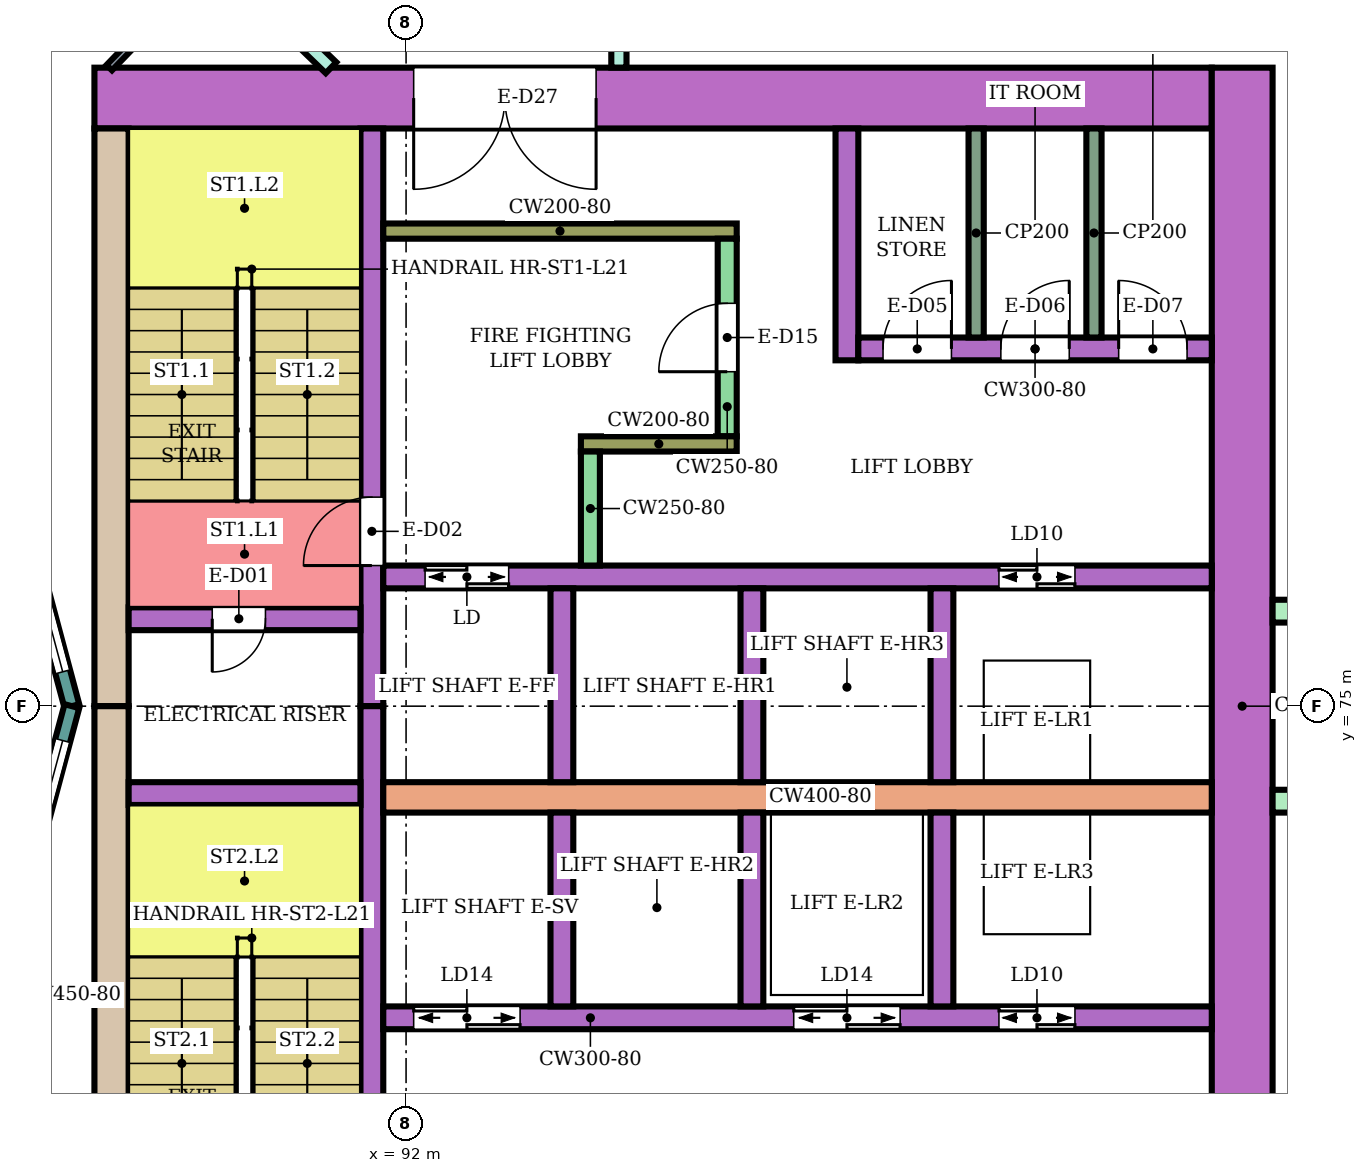
"""IFC4 building model, lengths in metres.
Left out: names, types, materials, properties, quantities, classifications, styles, units other than length and angle.
Written with IfcOpenShell. Run it as: python <this file> out.ifc"""

import sys

from ifc_helpers import new_model, si_unit, direction, frame, frame_2d, origin, place, context, subcontext, project, spatial, rectangle, extrude, element, fill, save


model = new_model("IFC4")
c1 = context("Model", 3, precision=1e-05, world=origin(), true_north=direction((0.0, 1.0)))
c2 = subcontext(c1, "Body", "Model", "MODEL_VIEW")
j1 = project(units=[si_unit("LENGTHUNIT", "METRE"), si_unit("PLANEANGLEUNIT", "RADIAN")], contexts=[c1])
p1 = place(None, origin())
s1 = spatial("IfcSite", under=j1, at=p1, CompositionType="ELEMENT")
p2 = place(p1, origin())
s2 = spatial("IfcBuilding", under=s1, at=p2, CompositionType="ELEMENT")
p3 = place(p2, frame((0.0, 0.0, 93.8)))
s3 = spatial("IfcBuildingStorey", under=s2, at=p3, CompositionType="ELEMENT", Elevation=93.8)
p4 = place(p3, frame((87.9, 83.0, 0.0), z_axis=(0.0, 0.0, 1.0), x_axis=(1.0, 0.0, 0.0)))
e1 = element("IfcWall", 1, at=p4, inside=s3, PredefinedType="SHEAR", context=c2, shape_type="SweptSolid", body=[
    extrude(rectangle(XDim=14.7, YDim=0.8, at=frame_2d((7.35, 0.0))), origin(), (0.0, 0.0, 1.0), 3.48),
])
p5 = place(p4, frame((4.2, 0.0, 0.0)))
e2 = element("IfcOpeningElement", 2, at=p5, cuts=e1, PredefinedType="OPENING", context=c2, shape_type="SweptSolid", body=[
    extrude(rectangle(XDim=2.4, YDim=2.4, at=frame_2d((1.2, 1.2))), frame((0.0, 0.41, 0.0), z_axis=(0.0, -1.0, 0.0), x_axis=(1.0, 0.0, 0.0)), (0.0, 0.0, 1.0), 0.82),
])
for number, where, z_axis, x_axis in (
    (3, (88.125, 75.0, 0.0), (0.0, 0.0, 1.0), (0.0, 1.0, 0.0)),
    (4, (88.125, 67.4, 0.0), (0.0, 0.0, 1.0), (0.0, 1.0, 0.0)),
):
    element("IfcWall", number, at=place(p3, frame(where, z_axis=z_axis, x_axis=x_axis)), inside=s3, PredefinedType="SHEAR", context=c2, shape_type="SweptSolid", body=[
        extrude(rectangle(XDim=7.6, YDim=0.45, at=frame_2d((3.8, 0.0))), origin(), (0.0, 0.0, 1.0), 3.48),
    ])
p6 = place(p3, frame((103.0, 66.6, 0.0), z_axis=(0.0, 0.0, 1.0), x_axis=(0.0, 1.0, 0.0)))
e5 = element("IfcWall", 5, at=p6, inside=s3, PredefinedType="SHEAR", context=c2, shape_type="SweptSolid", body=[
    extrude(rectangle(XDim=16.8, YDim=0.8, at=frame_2d((8.4, 0.0))), origin(), (0.0, 0.0, 1.0), 3.48),
])
p7 = place(p3, frame((91.55, 75.0, 0.0), z_axis=(0.0, 0.0, 1.0), x_axis=(0.0, 1.0, 0.0)))
e6 = element("IfcWall", 6, at=p7, inside=s3, PredefinedType="SHEAR", context=c2, shape_type="SweptSolid", body=[
    extrude(rectangle(XDim=7.6, YDim=0.3, at=frame_2d((3.8, 0.0))), origin(), (0.0, 0.0, 1.0), 3.48),
])
p8 = place(p7, frame((1.85, 0.0, 0.0)))
e7 = element("IfcOpeningElement", 7, at=p8, cuts=e6, PredefinedType="OPENING", context=c2, shape_type="SweptSolid", body=[
    extrude(rectangle(XDim=0.9, YDim=2.1, at=frame_2d((0.45, 1.05))), frame((0.0, 0.16, 0.0), z_axis=(0.0, -1.0, 0.0), x_axis=(1.0, 0.0, 0.0)), (0.0, 0.0, 1.0), 0.32),
])
p9 = place(p3, frame((91.55, 67.4, 0.0), z_axis=(0.0, 0.0, 1.0), x_axis=(0.0, 1.0, 0.0)))
e8 = element("IfcWall", 8, at=p9, inside=s3, PredefinedType="SHEAR", context=c2, shape_type="SweptSolid", body=[
    extrude(rectangle(XDim=7.6, YDim=0.3, at=frame_2d((3.8, 0.0))), origin(), (0.0, 0.0, 1.0), 3.48),
])
p10 = place(p9, frame((0.25, 0.0, 0.0)))
e9 = element("IfcOpeningElement", 9, at=p10, cuts=e8, PredefinedType="OPENING", context=c2, shape_type="SweptSolid", body=[
    extrude(rectangle(XDim=0.9, YDim=2.1, at=frame_2d((0.45, 1.05))), frame((0.0, 0.16, 0.0), z_axis=(0.0, -1.0, 0.0), x_axis=(1.0, 0.0, 0.0)), (0.0, 0.0, 1.0), 0.32),
])
p11 = place(p3, frame((88.35, 76.15, 0.0), z_axis=(0.0, 0.0, 1.0), x_axis=(1.0, 0.0, 0.0)))
e10 = element("IfcWall", 10, at=p11, inside=s3, PredefinedType="SHEAR", context=c2, shape_type="SweptSolid", body=[
    extrude(rectangle(XDim=3.05, YDim=0.3, at=frame_2d((1.525, 0.0))), origin(), (0.0, 0.0, 1.0), 3.48),
])
p12 = place(p11, frame((1.1, 0.0, 0.0)))
e11 = element("IfcOpeningElement", 11, at=p12, cuts=e10, PredefinedType="OPENING", context=c2, shape_type="SweptSolid", body=[
    extrude(rectangle(XDim=0.7, YDim=2.0, at=frame_2d((0.35, 1.0))), frame((0.0, 0.16, 0.0), z_axis=(0.0, -1.0, 0.0), x_axis=(1.0, 0.0, 0.0)), (0.0, 0.0, 1.0), 0.32),
])
p13 = place(p3, frame((88.35, 73.85, 0.0), z_axis=(0.0, 0.0, 1.0), x_axis=(1.0, 0.0, 0.0)))
e12 = element("IfcWall", 12, at=p13, inside=s3, PredefinedType="SHEAR", context=c2, shape_type="SweptSolid", body=[
    extrude(rectangle(XDim=3.05, YDim=0.3, at=frame_2d((1.525, 0.0))), origin(), (0.0, 0.0, 1.0), 3.48),
])
p14 = place(p3, frame((91.7, 76.7, 0.0), z_axis=(0.0, 0.0, 1.0), x_axis=(1.0, 0.0, 0.0)))
e13 = element("IfcWall", 13, at=p14, inside=s3, PredefinedType="SHEAR", context=c2, shape_type="SweptSolid", body=[
    extrude(rectangle(XDim=10.9, YDim=0.3, at=frame_2d((5.45, 0.0))), origin(), (0.0, 0.0, 1.0), 3.48),
])
p15 = place(p14, frame((0.55, 0.0, 0.0)))
e14 = element("IfcOpeningElement", 14, at=p15, cuts=e13, PredefinedType="OPENING", context=c2, shape_type="SweptSolid", body=[
    extrude(rectangle(XDim=1.1, YDim=2.1, at=frame_2d((0.55, 1.05))), frame((0.0, 0.16, 0.0), z_axis=(0.0, -1.0, 0.0), x_axis=(1.0, 0.0, 0.0)), (0.0, 0.0, 1.0), 0.32),
])
p16 = place(p14, frame((8.1, 0.0, 0.0)))
e15 = element("IfcOpeningElement", 15, at=p16, cuts=e13, PredefinedType="OPENING", context=c2, shape_type="SweptSolid", body=[
    extrude(rectangle(XDim=1.0, YDim=2.1, at=frame_2d((0.5, 1.05))), frame((0.0, 0.16, 0.0), z_axis=(0.0, -1.0, 0.0), x_axis=(1.0, 0.0, 0.0)), (0.0, 0.0, 1.0), 0.32),
])
p17 = place(p3, frame((91.7, 73.8, 0.0), z_axis=(0.0, 0.0, 1.0), x_axis=(1.0, 0.0, 0.0)))
e16 = element("IfcWall", 16, at=p17, inside=s3, PredefinedType="SHEAR", context=c2, shape_type="SweptSolid", body=[
    extrude(rectangle(XDim=10.9, YDim=0.4, at=frame_2d((5.45, 0.0))), origin(), (0.0, 0.0, 1.0), 3.48),
])
p18 = place(p3, frame((91.7, 70.9, 0.0), z_axis=(0.0, 0.0, 1.0), x_axis=(1.0, 0.0, 0.0)))
e17 = element("IfcWall", 17, at=p18, inside=s3, PredefinedType="SHEAR", context=c2, shape_type="SweptSolid", body=[
    extrude(rectangle(XDim=10.9, YDim=0.3, at=frame_2d((5.45, 0.0))), origin(), (0.0, 0.0, 1.0), 3.48),
])
p19 = place(p18, frame((0.4, 0.0, 0.0)))
e18 = element("IfcOpeningElement", 18, at=p19, cuts=e17, PredefinedType="OPENING", context=c2, shape_type="SweptSolid", body=[
    extrude(rectangle(XDim=1.4, YDim=2.1, at=frame_2d((0.7, 1.05))), frame((0.0, 0.16, 0.0), z_axis=(0.0, -1.0, 0.0), x_axis=(1.0, 0.0, 0.0)), (0.0, 0.0, 1.0), 0.32),
])
p20 = place(p18, frame((5.4, 0.0, 0.0)))
e19 = element("IfcOpeningElement", 19, at=p20, cuts=e17, PredefinedType="OPENING", context=c2, shape_type="SweptSolid", body=[
    extrude(rectangle(XDim=1.4, YDim=2.1, at=frame_2d((0.7, 1.05))), frame((0.0, 0.16, 0.0), z_axis=(0.0, -1.0, 0.0), x_axis=(1.0, 0.0, 0.0)), (0.0, 0.0, 1.0), 0.32),
])
p21 = place(p18, frame((8.1, 0.0, 0.0)))
e20 = element("IfcOpeningElement", 20, at=p21, cuts=e17, PredefinedType="OPENING", context=c2, shape_type="SweptSolid", body=[
    extrude(rectangle(XDim=1.0, YDim=2.1, at=frame_2d((0.5, 1.05))), frame((0.0, 0.16, 0.0), z_axis=(0.0, -1.0, 0.0), x_axis=(1.0, 0.0, 0.0)), (0.0, 0.0, 1.0), 0.32),
])
for number, where, z_axis, x_axis in (
    (21, (94.05, 74.0, 0.0), (0.0, 0.0, 1.0), (0.0, 1.0, 0.0)),
    (22, (96.55, 74.0, 0.0), (0.0, 0.0, 1.0), (0.0, 1.0, 0.0)),
    (23, (99.05, 74.0, 0.0), (0.0, 0.0, 1.0), (0.0, 1.0, 0.0)),
    (24, (94.05, 71.05, 0.0), (0.0, 0.0, 1.0), (0.0, 1.0, 0.0)),
    (25, (96.55, 71.05, 0.0), (0.0, 0.0, 1.0), (0.0, 1.0, 0.0)),
    (26, (99.05, 71.05, 0.0), (0.0, 0.0, 1.0), (0.0, 1.0, 0.0)),
):
    element("IfcWall", number, at=place(p3, frame(where, z_axis=z_axis, x_axis=x_axis)), inside=s3, PredefinedType="SHEAR", context=c2, shape_type="SweptSolid", body=[
        extrude(rectangle(XDim=2.55, YDim=0.3, at=frame_2d((1.275, 0.0))), origin(), (0.0, 0.0, 1.0), 3.48),
    ])
p22 = place(p3, frame((91.7, 81.25, 0.0), z_axis=(0.0, 0.0, 1.0), x_axis=(1.0, 0.0, 0.0)))
e27 = element("IfcWall", 27, at=p22, inside=s3, PredefinedType="SHEAR", context=c2, shape_type="SweptSolid", body=[
    extrude(rectangle(XDim=4.65, YDim=0.2, at=frame_2d((2.325, 0.0))), origin(), (0.0, 0.0, 1.0), 3.48),
])
p23 = place(p3, frame((96.225, 78.55, 0.0), z_axis=(0.0, 0.0, 1.0), x_axis=(0.0, 1.0, 0.0)))
e28 = element("IfcWall", 28, at=p23, inside=s3, PredefinedType="SHEAR", context=c2, shape_type="SweptSolid", body=[
    extrude(rectangle(XDim=2.6, YDim=0.25, at=frame_2d((1.3, 0.0))), origin(), (0.0, 0.0, 1.0), 3.48),
])
p24 = place(p23, frame((0.85, 0.0, 0.0)))
e29 = element("IfcOpeningElement", 29, at=p24, cuts=e28, PredefinedType="OPENING", context=c2, shape_type="SweptSolid", body=[
    extrude(rectangle(XDim=0.9, YDim=2.1, at=frame_2d((0.45, 1.05))), frame((0.0, 0.135, 0.0), z_axis=(0.0, -1.0, 0.0), x_axis=(1.0, 0.0, 0.0)), (0.0, 0.0, 1.0), 0.27),
])
p25 = place(p3, frame((94.3, 78.45, 0.0), z_axis=(0.0, 0.0, 1.0), x_axis=(1.0, 0.0, 0.0)))
e30 = element("IfcWall", 30, at=p25, inside=s3, PredefinedType="SHEAR", context=c2, shape_type="SweptSolid", body=[
    extrude(rectangle(XDim=2.05, YDim=0.2, at=frame_2d((1.025, 0.0))), origin(), (0.0, 0.0, 1.0), 3.48),
])
p26 = place(p3, frame((94.425, 76.85, 0.0), z_axis=(0.0, 0.0, 1.0), x_axis=(0.0, 1.0, 0.0)))
e31 = element("IfcWall", 31, at=p26, inside=s3, PredefinedType="SHEAR", context=c2, shape_type="SweptSolid", body=[
    extrude(rectangle(XDim=1.5, YDim=0.25, at=frame_2d((0.75, 0.0))), origin(), (0.0, 0.0, 1.0), 3.48),
])
p27 = place(p3, frame((97.8, 79.55, 0.0), z_axis=(0.0, 0.0, 1.0), x_axis=(0.0, 1.0, 0.0)))
e32 = element("IfcWall", 32, at=p27, inside=s3, PredefinedType="SHEAR", context=c2, shape_type="SweptSolid", body=[
    extrude(rectangle(XDim=3.05, YDim=0.3, at=frame_2d((1.525, 0.0))), origin(), (0.0, 0.0, 1.0), 3.48),
])
p28 = place(p3, frame((97.95, 79.7, 0.0), z_axis=(0.0, 0.0, 1.0), x_axis=(1.0, 0.0, 0.0)))
e33 = element("IfcWall", 33, at=p28, inside=s3, PredefinedType="SHEAR", context=c2, shape_type="SweptSolid", body=[
    extrude(rectangle(XDim=4.65, YDim=0.3, at=frame_2d((2.325, 0.0))), origin(), (0.0, 0.0, 1.0), 3.48),
])
p29 = place(p28, frame((0.325, 0.0, 0.0)))
e34 = element("IfcOpeningElement", 34, at=p29, cuts=e33, PredefinedType="OPENING", context=c2, shape_type="SweptSolid", body=[
    extrude(rectangle(XDim=0.9, YDim=2.1, at=frame_2d((0.45, 1.05))), frame((0.0, 0.16, 0.0), z_axis=(0.0, -1.0, 0.0), x_axis=(1.0, 0.0, 0.0)), (0.0, 0.0, 1.0), 0.32),
])
p30 = place(p28, frame((1.875, 0.0, 0.0)))
e35 = element("IfcOpeningElement", 35, at=p30, cuts=e33, PredefinedType="OPENING", context=c2, shape_type="SweptSolid", body=[
    extrude(rectangle(XDim=0.9, YDim=2.1, at=frame_2d((0.45, 1.05))), frame((0.0, 0.16, 0.0), z_axis=(0.0, -1.0, 0.0), x_axis=(1.0, 0.0, 0.0)), (0.0, 0.0, 1.0), 0.32),
])
p31 = place(p28, frame((3.425, 0.0, 0.0)))
e36 = element("IfcOpeningElement", 36, at=p31, cuts=e33, PredefinedType="OPENING", context=c2, shape_type="SweptSolid", body=[
    extrude(rectangle(XDim=0.9, YDim=2.1, at=frame_2d((0.45, 1.05))), frame((0.0, 0.16, 0.0), z_axis=(0.0, -1.0, 0.0), x_axis=(1.0, 0.0, 0.0)), (0.0, 0.0, 1.0), 0.32),
])
for number, where, z_axis, x_axis in (
    (37, (103.4, 73.75, 0.0), (0.0, 0.0, 1.0), (1.0, 0.0, 0.0)),
    (38, (103.4, 76.25, 0.0), (0.0, 0.0, 1.0), (1.0, 0.0, 0.0)),
):
    element("IfcWall", number, at=place(p3, frame(where, z_axis=z_axis, x_axis=x_axis)), inside=s3, PredefinedType="NOTDEFINED", context=c2, shape_type="SweptSolid", body=[
        extrude(rectangle(XDim=2.416, YDim=0.3, at=frame_2d((1.208, 0.0))), origin(), (0.0, 0.0, 1.0), 3.8),
    ])
p32 = place(p3, frame((87.604, 75.0, 0.0), z_axis=(0.0, 0.0, 1.0), x_axis=(-0.258789828301, 0.965933654434, 0.0)))
e39 = element("IfcWall", 39, at=p32, inside=s3, PredefinedType="NOTDEFINED", context=c2, shape_type="SweptSolid", body=[
    extrude(rectangle(XDim=3.936, YDim=0.2, at=frame_2d((1.968, 0.0))), origin(), (0.0, 0.0, 1.0), 3.8),
])
p33 = place(p32, frame((0.468, 0.0, 0.9)))
e40 = element("IfcOpeningElement", 40, at=p33, cuts=e39, PredefinedType="OPENING", context=c2, shape_type="SweptSolid", body=[
    extrude(rectangle(XDim=3.0, YDim=2.3, at=frame_2d((1.5, 1.15))), frame((0.0, 0.11, 0.0), z_axis=(0.0, -1.0, 0.0), x_axis=(1.0, 0.0, 0.0)), (0.0, 0.0, 1.0), 0.22),
])
p34 = place(p3, frame((86.585, 71.198, 0.0), z_axis=(0.0, 0.0, 1.0), x_axis=(0.258789828301, 0.965933654434, 0.0)))
e41 = element("IfcWall", 41, at=p34, inside=s3, PredefinedType="NOTDEFINED", context=c2, shape_type="SweptSolid", body=[
    extrude(rectangle(XDim=3.936, YDim=0.2, at=frame_2d((1.968, 0.0))), origin(), (0.0, 0.0, 1.0), 3.8),
])
p35 = place(p34, frame((0.468, 0.0, 0.9)))
e42 = element("IfcOpeningElement", 42, at=p35, cuts=e41, PredefinedType="OPENING", context=c2, shape_type="SweptSolid", body=[
    extrude(rectangle(XDim=3.0, YDim=2.3, at=frame_2d((1.5, 1.15))), frame((0.0, 0.11, 0.0), z_axis=(0.0, -1.0, 0.0), x_axis=(1.0, 0.0, 0.0)), (0.0, 0.0, 1.0), 0.22),
])
p36 = place(p3, frame((87.064, 87.211, 0.0), z_axis=(0.0, 0.0, 1.0), x_axis=(0.719540958932, -0.694450004262, 0.0)))
e43 = element("IfcWall", 43, at=p36, inside=s3, PredefinedType="PARTITIONING", context=c2, shape_type="SweptSolid", body=[
    extrude(rectangle(XDim=5.488, YDim=0.2, at=frame_2d((2.744, 0.0))), origin(), (0.0, 0.0, 1.0), 3.35),
])
p37 = place(p36, frame((0.55, 0.0, 0.0)))
e44 = element("IfcOpeningElement", 44, at=p37, cuts=e43, PredefinedType="OPENING", context=c2, shape_type="SweptSolid", body=[
    extrude(rectangle(XDim=1.0, YDim=2.1, at=frame_2d((0.5, 1.05))), frame((0.0, 0.11, 0.0), z_axis=(0.0, -1.0, 0.0), x_axis=(1.0, 0.0, 0.0)), (0.0, 0.0, 1.0), 0.22),
])
p38 = place(p3, frame((94.8, 83.401, 0.0), z_axis=(0.0, 0.0, 1.0), x_axis=(0.0, 1.0, 0.0)))
e45 = element("IfcWall", 45, at=p38, inside=s3, PredefinedType="PARTITIONING", context=c2, shape_type="SweptSolid", body=[
    extrude(rectangle(XDim=1.499, YDim=0.2, at=frame_2d((0.75, 0.0))), origin(), (0.0, 0.0, 1.0), 3.35),
])
p39 = place(p3, frame((88.095, 83.4, 0.0), z_axis=(0.0, 0.0, 1.0), x_axis=(0.694447472534, 0.719543402368, 0.0)))
e46 = element("IfcWall", 46, at=p39, inside=s3, PredefinedType="PARTITIONING", context=c2, shape_type="SweptSolid", body=[
    extrude(rectangle(XDim=1.926, YDim=0.1, at=frame_2d((0.963, 0.0))), origin(), (0.0, 0.0, 1.0), 3.35),
])
p40 = place(p39, frame((0.613, 0.0, 0.0)))
e47 = element("IfcOpeningElement", 47, at=p40, cuts=e46, PredefinedType="OPENING", context=c2, shape_type="SweptSolid", body=[
    extrude(rectangle(XDim=0.8, YDim=2.1, at=frame_2d((0.4, 1.05))), frame((0.0, 0.06, 0.0), z_axis=(0.0, -1.0, 0.0), x_axis=(1.0, 0.0, 0.0)), (0.0, 0.0, 1.0), 0.12),
])
for number, where, z_axis, x_axis in (
    (48, (99.5, 79.85, 0.0), (0.0, 0.0, 1.0), (0.0, 1.0, 0.0)),
    (49, (101.05, 79.85, 0.0), (0.0, 0.0, 1.0), (0.0, 1.0, 0.0)),
):
    element("IfcWall", number, at=place(p3, frame(where, z_axis=z_axis, x_axis=x_axis)), inside=s3, PredefinedType="PARTITIONING", context=c2, shape_type="SweptSolid", body=[
        extrude(rectangle(XDim=2.75, YDim=0.2, at=frame_2d((1.375, 0.0))), origin(), (0.0, 0.0, 1.0), 3.48),
    ])
p41 = place(p33, origin())
e50 = element("IfcWindow", 50, at=p41, inside=s3, PartitioningType="SINGLE_PANEL", PredefinedType="WINDOW", context=c2, shape_type="SweptSolid", body=[
    extrude(rectangle(XDim=3.0, YDim=2.3, at=frame_2d((1.5, 1.15))), frame((0.0, 0.03, 0.0), z_axis=(0.0, -1.0, 0.0), x_axis=(1.0, 0.0, 0.0)), (0.0, 0.0, 1.0), 0.06),
])
fill(e40, e50)
p42 = place(p35, origin())
e51 = element("IfcWindow", 51, at=p42, inside=s3, PartitioningType="SINGLE_PANEL", PredefinedType="WINDOW", context=c2, shape_type="SweptSolid", body=[
    extrude(rectangle(XDim=3.0, YDim=2.3, at=frame_2d((1.5, 1.15))), frame((0.0, 0.03, 0.0), z_axis=(0.0, -1.0, 0.0), x_axis=(1.0, 0.0, 0.0)), (0.0, 0.0, 1.0), 0.06),
])
fill(e42, e51)
p43 = place(p12, frame((0.7, 0.0, 0.0), z_axis=(0.0, 0.0, 1.0), x_axis=(-1.0, 0.0, 0.0)))
e52 = element("IfcDoor", 52, at=p43, inside=s3, OperationType="SINGLE_SWING_RIGHT", PredefinedType="DOOR", context=c2, shape_type="SweptSolid", body=[
    extrude(rectangle(XDim=0.7, YDim=2.0, at=frame_2d((0.35, 1.0))), frame((0.0, 0.025, 0.0), z_axis=(0.0, -1.0, 0.0), x_axis=(1.0, 0.0, 0.0)), (0.0, 0.0, 1.0), 0.05),
])
fill(e11, e52)
p44 = place(p8, origin())
e53 = element("IfcDoor", 53, at=p44, inside=s3, OperationType="SINGLE_SWING_LEFT", PredefinedType="DOOR", context=c2, shape_type="SweptSolid", body=[
    extrude(rectangle(XDim=0.9, YDim=2.1, at=frame_2d((0.45, 1.05))), frame((0.0, 0.025, 0.0), z_axis=(0.0, -1.0, 0.0), x_axis=(1.0, 0.0, 0.0)), (0.0, 0.0, 1.0), 0.05),
])
fill(e7, e53)
p45 = place(p15, origin())
e54 = element("IfcDoor", 54, at=p45, inside=s3, OperationType="DOUBLE_DOOR_SLIDING", PredefinedType="DOOR", context=c2, shape_type="SweptSolid", body=[
    extrude(rectangle(XDim=1.1, YDim=2.1, at=frame_2d((0.55, 1.05))), frame((0.0, 0.025, 0.0), z_axis=(0.0, -1.0, 0.0), x_axis=(1.0, 0.0, 0.0)), (0.0, 0.0, 1.0), 0.05),
])
fill(e14, e54)
p46 = place(p16, origin())
e55 = element("IfcDoor", 55, at=p46, inside=s3, OperationType="DOUBLE_DOOR_SLIDING", PredefinedType="DOOR", context=c2, shape_type="SweptSolid", body=[
    extrude(rectangle(XDim=1.0, YDim=2.1, at=frame_2d((0.5, 1.05))), frame((0.0, 0.025, 0.0), z_axis=(0.0, -1.0, 0.0), x_axis=(1.0, 0.0, 0.0)), (0.0, 0.0, 1.0), 0.05),
])
fill(e15, e55)
p47 = place(p19, origin())
e56 = element("IfcDoor", 56, at=p47, inside=s3, OperationType="DOUBLE_DOOR_SLIDING", PredefinedType="DOOR", context=c2, shape_type="SweptSolid", body=[
    extrude(rectangle(XDim=1.4, YDim=2.1, at=frame_2d((0.7, 1.05))), frame((0.0, 0.025, 0.0), z_axis=(0.0, -1.0, 0.0), x_axis=(1.0, 0.0, 0.0)), (0.0, 0.0, 1.0), 0.05),
])
fill(e18, e56)
p48 = place(p20, origin())
e57 = element("IfcDoor", 57, at=p48, inside=s3, OperationType="DOUBLE_DOOR_SLIDING", PredefinedType="DOOR", context=c2, shape_type="SweptSolid", body=[
    extrude(rectangle(XDim=1.4, YDim=2.1, at=frame_2d((0.7, 1.05))), frame((0.0, 0.025, 0.0), z_axis=(0.0, -1.0, 0.0), x_axis=(1.0, 0.0, 0.0)), (0.0, 0.0, 1.0), 0.05),
])
fill(e19, e57)
p49 = place(p21, origin())
e58 = element("IfcDoor", 58, at=p49, inside=s3, OperationType="DOUBLE_DOOR_SLIDING", PredefinedType="DOOR", context=c2, shape_type="SweptSolid", body=[
    extrude(rectangle(XDim=1.0, YDim=2.1, at=frame_2d((0.5, 1.05))), frame((0.0, 0.025, 0.0), z_axis=(0.0, -1.0, 0.0), x_axis=(1.0, 0.0, 0.0)), (0.0, 0.0, 1.0), 0.05),
])
fill(e20, e58)
p50 = place(p24, origin())
e59 = element("IfcDoor", 59, at=p50, inside=s3, OperationType="SINGLE_SWING_LEFT", PredefinedType="DOOR", context=c2, shape_type="SweptSolid", body=[
    extrude(rectangle(XDim=0.9, YDim=2.1, at=frame_2d((0.45, 1.05))), frame((0.0, 0.025, 0.0), z_axis=(0.0, -1.0, 0.0), x_axis=(1.0, 0.0, 0.0)), (0.0, 0.0, 1.0), 0.05),
])
fill(e29, e59)
p51 = place(p29, origin())
e60 = element("IfcDoor", 60, at=p51, inside=s3, OperationType="SINGLE_SWING_RIGHT", PredefinedType="DOOR", context=c2, shape_type="SweptSolid", body=[
    extrude(rectangle(XDim=0.9, YDim=2.1, at=frame_2d((0.45, 1.05))), frame((0.0, 0.025, 0.0), z_axis=(0.0, -1.0, 0.0), x_axis=(1.0, 0.0, 0.0)), (0.0, 0.0, 1.0), 0.05),
])
fill(e34, e60)
p52 = place(p30, origin())
e61 = element("IfcDoor", 61, at=p52, inside=s3, OperationType="SINGLE_SWING_RIGHT", PredefinedType="DOOR", context=c2, shape_type="SweptSolid", body=[
    extrude(rectangle(XDim=0.9, YDim=2.1, at=frame_2d((0.45, 1.05))), frame((0.0, 0.025, 0.0), z_axis=(0.0, -1.0, 0.0), x_axis=(1.0, 0.0, 0.0)), (0.0, 0.0, 1.0), 0.05),
])
fill(e35, e61)
p53 = place(p31, origin())
e62 = element("IfcDoor", 62, at=p53, inside=s3, OperationType="SINGLE_SWING_LEFT", PredefinedType="DOOR", context=c2, shape_type="SweptSolid", body=[
    extrude(rectangle(XDim=0.9, YDim=2.1, at=frame_2d((0.45, 1.05))), frame((0.0, 0.025, 0.0), z_axis=(0.0, -1.0, 0.0), x_axis=(1.0, 0.0, 0.0)), (0.0, 0.0, 1.0), 0.05),
])
fill(e36, e62)
p54 = place(p5, frame((2.4, 0.0, 0.0), z_axis=(0.0, 0.0, 1.0), x_axis=(-1.0, 0.0, 0.0)))
e63 = element("IfcDoor", 63, at=p54, inside=s3, OperationType="DOUBLE_DOOR_SINGLE_SWING", PredefinedType="DOOR", context=c2, shape_type="SweptSolid", body=[
    extrude(rectangle(XDim=2.4, YDim=2.4, at=frame_2d((1.2, 1.2))), frame((0.0, 0.025, 0.0), z_axis=(0.0, -1.0, 0.0), x_axis=(1.0, 0.0, 0.0)), (0.0, 0.0, 1.0), 0.05),
])
fill(e2, e63)
save(model, sys.argv[1])
